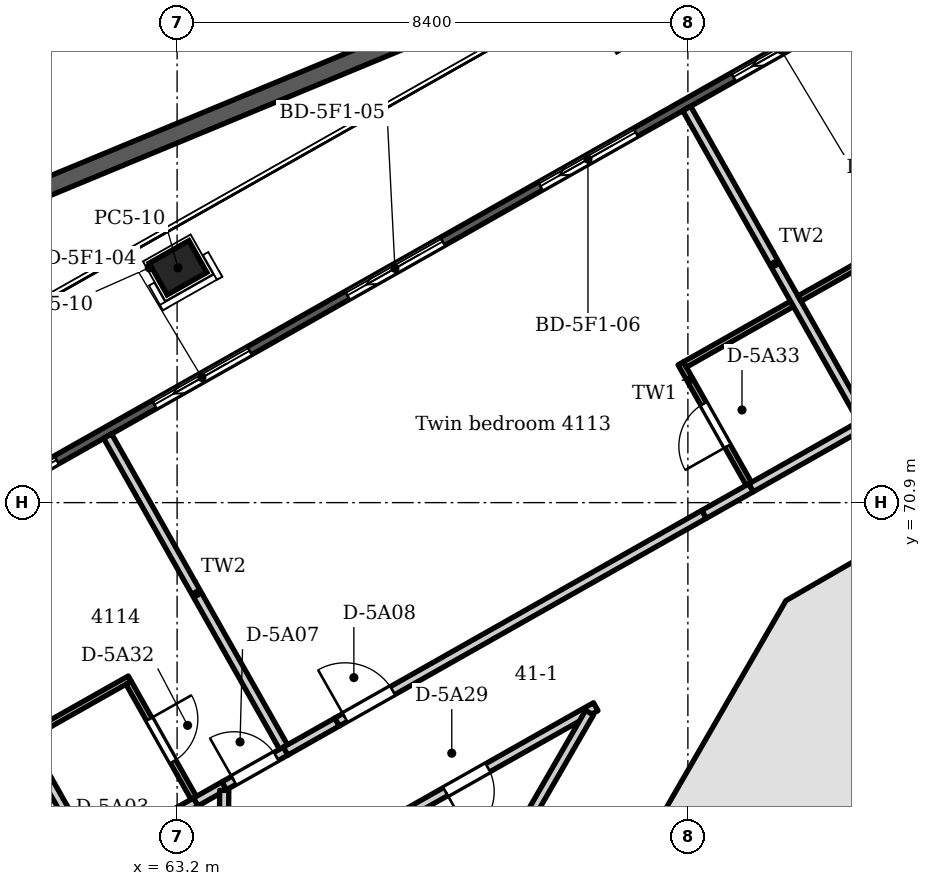
"""IFC4 building model, lengths in metres.
Left out: names, types, materials, properties, quantities, classifications, styles, units other than length and angle.
Written with IfcOpenShell. Run it as: python <this file> out.ifc"""

import sys

from ifc_helpers import new_model, si_unit, direction, frame, frame_2d, origin, origin_2d, place, context, subcontext, project, spatial, polyline, rectangle, outline, extrude, element, fill, save


model = new_model("IFC4")
c1 = context("Model", 3, precision=1e-05, world=origin(), true_north=direction((0.0, 1.0)))
c2 = subcontext(c1, "Body", "Model", "MODEL_VIEW")
j1 = project(units=[si_unit("LENGTHUNIT", "METRE"), si_unit("PLANEANGLEUNIT", "RADIAN")], contexts=[c1])
p1 = place(None, origin())
s1 = spatial("IfcSite", under=j1, at=p1, CompositionType="ELEMENT")
p2 = place(p1, origin())
s2 = spatial("IfcBuilding", under=s1, at=p2, CompositionType="ELEMENT")
p3 = place(p2, frame((0.0, 0.0, 161.1)))
s3 = spatial("IfcBuildingStorey", under=s2, at=p3, CompositionType="ELEMENT", Elevation=161.1)
p4 = place(p3, frame((77.74, 71.383, 0.0), z_axis=(0.0, 0.0, 1.0), x_axis=(-0.866003133579, -0.500038571144, 0.0)))
e1 = element("IfcWall", 1, at=p4, inside=s3, PredefinedType="SHEAR", context=c2, shape_type="SweptSolid", body=[
    extrude(outline(polyline([(0.0, -0.45), (4.969, -0.45), (4.728, 0.45), (0.241, 0.45), (0.0, -0.45)])), origin(), (0.0, 0.0, 1.0), 3.6),
])
p5 = place(p4, frame((0.895, 0.0, 0.0)))
e2 = element("IfcOpeningElement", 2, at=p5, cuts=e1, PredefinedType="OPENING", context=c2, shape_type="SweptSolid", body=[
    extrude(rectangle(XDim=0.9, YDim=2.1, at=frame_2d((0.45, 1.05))), frame((0.0, 0.46, 0.0), z_axis=(0.0, -1.0, 0.0), x_axis=(1.0, 0.0, 0.0)), (0.0, 0.0, 1.0), 0.92),
])
p6 = place(p4, frame((3.184, 0.0, 0.0)))
e3 = element("IfcOpeningElement", 3, at=p6, cuts=e1, PredefinedType="OPENING", context=c2, shape_type="SweptSolid", body=[
    extrude(rectangle(XDim=0.9, YDim=2.1, at=frame_2d((0.45, 1.05))), frame((0.0, 0.46, 0.0), z_axis=(0.0, -1.0, 0.0), x_axis=(1.0, 0.0, 0.0)), (0.0, 0.0, 1.0), 0.92),
])
p7 = place(p3, frame((73.602, 69.063, 0.0), z_axis=(0.0, 0.0, 1.0), x_axis=(-0.500038571144, -0.866003133579, 0.0)))
e4 = element("IfcWall", 4, at=p7, inside=s3, PredefinedType="SHEAR", context=c2, shape_type="SweptSolid", body=[
    extrude(outline(polyline([(0.0, -0.45), (4.969, -0.45), (4.728, 0.45), (0.241, 0.45), (0.0, -0.45)])), origin(), (0.0, 0.0, 1.0), 3.6),
])
p8 = place(p7, frame((1.285, 0.0, 0.0)))
e5 = element("IfcOpeningElement", 5, at=p8, cuts=e4, PredefinedType="OPENING", context=c2, shape_type="SweptSolid", body=[
    extrude(rectangle(XDim=2.4, YDim=2.1, at=frame_2d((1.2, 1.05))), frame((0.0, 0.46, 0.0), z_axis=(0.0, -1.0, 0.0), x_axis=(1.0, 0.0, 0.0)), (0.0, 0.0, 1.0), 0.92),
])
p9 = place(p3, frame((77.731, 65.369, 0.0), z_axis=(0.0, 0.0, 1.0), x_axis=(-0.865983655544, 0.500072303102, 0.0)))
e6 = element("IfcWall", 6, at=p9, inside=s3, PredefinedType="SHEAR", context=c2, shape_type="SweptSolid", body=[
    extrude(rectangle(XDim=4.973, YDim=0.3, at=frame_2d((2.487, 0.0))), origin(), (0.0, 0.0, 1.0), 3.6),
])
p10 = place(p9, frame((1.351, 0.0, 0.0)))
e7 = element("IfcOpeningElement", 7, at=p10, cuts=e6, PredefinedType="OPENING", context=c2, shape_type="SweptSolid", body=[
    extrude(rectangle(XDim=1.0, YDim=2.1, at=frame_2d((0.5, 1.05))), frame((0.0, 0.16, 0.0), z_axis=(0.0, -1.0, 0.0), x_axis=(1.0, 0.0, 0.0)), (0.0, 0.0, 1.0), 0.32),
])
p11 = place(p3, frame((63.215, 74.762, -0.35), z_axis=(0.0, 0.0, 1.0), x_axis=(0.87035569594, 0.492423560103, 0.0)))
e8 = element("IfcColumn", 8, at=p11, inside=s3, PredefinedType="COLUMN", context=c2, shape_type="SweptSolid", body=[
    extrude(rectangle(XDim=0.75, YDim=0.6, at=origin_2d()), origin(), (0.0, 0.0, 1.0), 3.95),
])
p12 = place(p3, frame((52.498, 66.67, 0.0), z_axis=(0.0, 0.0, 1.0), x_axis=(0.870354973249, 0.492424837453, 0.0)))
e9 = element("IfcWall", 9, at=p12, inside=s3, PredefinedType="SOLIDWALL", context=c2, shape_type="SweptSolid", body=[
    extrude(outline(polyline([(0.149, 0.075), (0.149, -0.075), (43.617, -0.075), (43.617, 0.075), (0.149, 0.075)])), origin(), (0.0, 0.0, 1.0), 3.3),
])
p13 = place(p12, frame((1.224, 0.0, 0.0)))
e10 = element("IfcOpeningElement", 10, at=p13, cuts=e9, PredefinedType="OPENING", context=c2, shape_type="SweptSolid", body=[
    extrude(rectangle(XDim=1.8, YDim=2.6, at=frame_2d((0.9, 1.3))), frame((0.0, 0.085, 0.0), z_axis=(0.0, -1.0, 0.0), x_axis=(1.0, 0.0, 0.0)), (0.0, 0.0, 1.0), 0.17),
])
p14 = place(p12, frame((4.571, 0.0, 0.0)))
e11 = element("IfcOpeningElement", 11, at=p14, cuts=e9, PredefinedType="OPENING", context=c2, shape_type="SweptSolid", body=[
    extrude(rectangle(XDim=1.8, YDim=2.6, at=frame_2d((0.9, 1.3))), frame((0.0, 0.085, 0.0), z_axis=(0.0, -1.0, 0.0), x_axis=(1.0, 0.0, 0.0)), (0.0, 0.0, 1.0), 0.17),
])
p15 = place(p12, frame((8.218, 0.0, 0.0)))
e12 = element("IfcOpeningElement", 12, at=p15, cuts=e9, PredefinedType="OPENING", context=c2, shape_type="SweptSolid", body=[
    extrude(rectangle(XDim=1.8, YDim=2.6, at=frame_2d((0.9, 1.3))), frame((0.0, 0.085, 0.0), z_axis=(0.0, -1.0, 0.0), x_axis=(1.0, 0.0, 0.0)), (0.0, 0.0, 1.0), 0.17),
])
p16 = place(p12, frame((11.865, 0.0, 0.0)))
e13 = element("IfcOpeningElement", 13, at=p16, cuts=e9, PredefinedType="OPENING", context=c2, shape_type="SweptSolid", body=[
    extrude(rectangle(XDim=1.8, YDim=2.6, at=frame_2d((0.9, 1.3))), frame((0.0, 0.085, 0.0), z_axis=(0.0, -1.0, 0.0), x_axis=(1.0, 0.0, 0.0)), (0.0, 0.0, 1.0), 0.17),
])
p17 = place(p12, frame((15.512, 0.0, 0.0)))
e14 = element("IfcOpeningElement", 14, at=p17, cuts=e9, PredefinedType="OPENING", context=c2, shape_type="SweptSolid", body=[
    extrude(rectangle(XDim=1.8, YDim=2.6, at=frame_2d((0.9, 1.3))), frame((0.0, 0.085, 0.0), z_axis=(0.0, -1.0, 0.0), x_axis=(1.0, 0.0, 0.0)), (0.0, 0.0, 1.0), 0.17),
])
p18 = place(p12, frame((19.16, 0.0, 0.0)))
e15 = element("IfcOpeningElement", 15, at=p18, cuts=e9, PredefinedType="OPENING", context=c2, shape_type="SweptSolid", body=[
    extrude(rectangle(XDim=1.8, YDim=2.6, at=frame_2d((0.9, 1.3))), frame((0.0, 0.085, 0.0), z_axis=(0.0, -1.0, 0.0), x_axis=(1.0, 0.0, 0.0)), (0.0, 0.0, 1.0), 0.17),
])
p19 = place(p12, frame((22.807, 0.0, 0.0)))
e16 = element("IfcOpeningElement", 16, at=p19, cuts=e9, PredefinedType="OPENING", context=c2, shape_type="SweptSolid", body=[
    extrude(rectangle(XDim=1.8, YDim=2.6, at=frame_2d((0.9, 1.3))), frame((0.0, 0.085, 0.0), z_axis=(0.0, -1.0, 0.0), x_axis=(1.0, 0.0, 0.0)), (0.0, 0.0, 1.0), 0.17),
])
p20 = place(p12, frame((26.454, 0.0, 0.0)))
e17 = element("IfcOpeningElement", 17, at=p20, cuts=e9, PredefinedType="OPENING", context=c2, shape_type="SweptSolid", body=[
    extrude(rectangle(XDim=1.8, YDim=2.6, at=frame_2d((0.9, 1.3))), frame((0.0, 0.085, 0.0), z_axis=(0.0, -1.0, 0.0), x_axis=(1.0, 0.0, 0.0)), (0.0, 0.0, 1.0), 0.17),
])
p21 = place(p12, frame((30.101, 0.0, 0.0)))
e18 = element("IfcOpeningElement", 18, at=p21, cuts=e9, PredefinedType="OPENING", context=c2, shape_type="SweptSolid", body=[
    extrude(rectangle(XDim=1.8, YDim=2.6, at=frame_2d((0.9, 1.3))), frame((0.0, 0.085, 0.0), z_axis=(0.0, -1.0, 0.0), x_axis=(1.0, 0.0, 0.0)), (0.0, 0.0, 1.0), 0.17),
])
p22 = place(p12, frame((33.748, 0.0, 0.0)))
e19 = element("IfcOpeningElement", 19, at=p22, cuts=e9, PredefinedType="OPENING", context=c2, shape_type="SweptSolid", body=[
    extrude(rectangle(XDim=1.8, YDim=2.6, at=frame_2d((0.9, 1.3))), frame((0.0, 0.085, 0.0), z_axis=(0.0, -1.0, 0.0), x_axis=(1.0, 0.0, 0.0)), (0.0, 0.0, 1.0), 0.17),
])
p23 = place(p12, frame((37.396, 0.0, 0.0)))
e20 = element("IfcOpeningElement", 20, at=p23, cuts=e9, PredefinedType="OPENING", context=c2, shape_type="SweptSolid", body=[
    extrude(rectangle(XDim=1.8, YDim=2.6, at=frame_2d((0.9, 1.3))), frame((0.0, 0.085, 0.0), z_axis=(0.0, -1.0, 0.0), x_axis=(1.0, 0.0, 0.0)), (0.0, 0.0, 1.0), 0.17),
])
p24 = place(p12, frame((40.743, 0.0, 0.0)))
e21 = element("IfcOpeningElement", 21, at=p24, cuts=e9, PredefinedType="OPENING", context=c2, shape_type="SweptSolid", body=[
    extrude(rectangle(XDim=1.8, YDim=2.6, at=frame_2d((0.9, 1.3))), frame((0.0, 0.085, 0.0), z_axis=(0.0, -1.0, 0.0), x_axis=(1.0, 0.0, 0.0)), (0.0, 0.0, 1.0), 0.17),
])
p25 = place(p3, origin())
e22 = element("IfcWall", 22, at=p25, inside=s3, PredefinedType="PARAPET", context=c2, shape_type="SweptSolid", body=[
    extrude(outline(polyline([(74.388, 81.773), (46.836, 70.36), (47.111, 70.149), (72.246, 80.561), (74.388, 81.773)])), origin(), (0.0, 0.0, 1.0), 1.1),
])
p26 = place(p3, frame((58.884, 70.197, 0.0), z_axis=(0.0, 0.0, 1.0), x_axis=(0.492361245758, -0.870390948756, 0.0)))
e23 = element("IfcWall", 23, at=p26, inside=s3, PredefinedType="PARTITIONING", context=c2, shape_type="SweptSolid", body=[
    extrude(rectangle(XDim=5.875, YDim=0.15, at=frame_2d((2.937, 0.0))), origin(), (0.0, 0.0, 1.0), 3.3),
])
p27 = place(p3, frame((60.113, 64.057, 0.0), z_axis=(0.0, 0.0, 1.0), x_axis=(0.870300828713, 0.492520524995, 0.0)))
e24 = element("IfcWall", 24, at=p27, inside=s3, PredefinedType="PARTITIONING", context=c2, shape_type="SweptSolid", body=[
    extrude(rectangle(XDim=3.906, YDim=0.15, at=frame_2d((1.953, 0.0))), origin(), (0.0, 0.0, 1.0), 3.3),
])
p28 = place(p3, frame((60.745, 67.058, 0.0), z_axis=(0.0, 0.0, 1.0), x_axis=(0.870465997858, 0.492228551156, 0.0)))
e25 = element("IfcWall", 25, at=p28, inside=s3, PredefinedType="PARTITIONING", context=c2, shape_type="SweptSolid", body=[
    extrude(rectangle(XDim=1.926, YDim=0.1, at=frame_2d((0.963, 0.0))), origin(), (0.0, 0.0, 1.0), 3.3),
])
p29 = place(p3, frame((62.058, 71.993, 0.0), z_axis=(0.0, 0.0, 1.0), x_axis=(0.492391211334, -0.870373997199, 0.0)))
e26 = element("IfcWall", 26, at=p29, inside=s3, PredefinedType="PARTITIONING", context=c2, shape_type="SweptSolid", body=[
    extrude(rectangle(XDim=5.949, YDim=0.15, at=frame_2d((2.975, 0.0))), origin(), (0.0, 0.0, 1.0), 3.3),
])
p30 = place(p3, frame((62.403, 67.938, 0.0), z_axis=(0.0, 0.0, 1.0), x_axis=(0.492205197529, -0.870479203385, 0.0)))
e27 = element("IfcWall", 27, at=p30, inside=s3, PredefinedType="PARTITIONING", context=c2, shape_type="SweptSolid", body=[
    extrude(rectangle(XDim=2.175, YDim=0.1, at=frame_2d((1.087, 0.0))), origin(), (0.0, 0.0, 1.0), 3.3),
])
p31 = place(p30, frame((0.688, 0.0, 0.0)))
e28 = element("IfcOpeningElement", 28, at=p31, cuts=e27, PredefinedType="OPENING", context=c2, shape_type="SweptSolid", body=[
    extrude(rectangle(XDim=0.8, YDim=2.1, at=frame_2d((0.4, 1.05))), frame((0.0, 0.06, 0.0), z_axis=(0.0, -1.0, 0.0), x_axis=(1.0, 0.0, 0.0)), (0.0, 0.0, 1.0), 0.12),
])
p32 = place(p3, frame((63.507, 65.977, 0.0), z_axis=(0.0, 0.0, 1.0), x_axis=(0.869938000449, 0.493161104888, 0.0)))
e29 = element("IfcWall", 29, at=p32, inside=s3, PredefinedType="PARTITIONING", context=c2, shape_type="SweptSolid", body=[
    extrude(rectangle(XDim=0.539, YDim=0.15, at=frame_2d((0.27, 0.0))), origin(), (0.0, 0.0, 1.0), 3.3),
])
p33 = place(p3, frame((63.932, 61.183, 0.0), z_axis=(0.0, 0.0, 1.0), x_axis=(0.008717466764, 0.999962002165, 0.0)))
e30 = element("IfcWall", 30, at=p33, inside=s3, PredefinedType="PARTITIONING", context=c2, shape_type="SweptSolid", body=[
    extrude(rectangle(XDim=4.985, YDim=0.15, at=frame_2d((2.493, 0.0))), origin(), (0.0, 0.0, 1.0), 2.75),
])
p34 = place(p33, frame((2.459, 0.0, 0.0)))
e31 = element("IfcOpeningElement", 31, at=p34, cuts=e30, PredefinedType="OPENING", context=c2, shape_type="SweptSolid", body=[
    extrude(rectangle(XDim=1.8, YDim=2.1, at=frame_2d((0.9, 1.05))), frame((0.0, 0.085, 0.0), z_axis=(0.0, -1.0, 0.0), x_axis=(1.0, 0.0, 0.0)), (0.0, 0.0, 1.0), 0.17),
])
p35 = place(p3, frame((63.976, 66.243, 0.0), z_axis=(0.0, 0.0, 1.0), x_axis=(0.870234820761, 0.492637145102, 0.0)))
e32 = element("IfcWall", 32, at=p35, inside=s3, PredefinedType="PARTITIONING", context=c2, shape_type="SweptSolid", body=[
    extrude(rectangle(XDim=1.165, YDim=0.15, at=frame_2d((0.583, 0.0))), origin(), (0.0, 0.0, 1.0), 3.3),
])
p36 = place(p35, frame((0.181, 0.0, 0.0)))
e33 = element("IfcOpeningElement", 33, at=p36, cuts=e32, PredefinedType="OPENING", context=c2, shape_type="SweptSolid", body=[
    extrude(rectangle(XDim=0.8, YDim=2.1, at=frame_2d((0.4, 1.05))), frame((0.0, 0.085, 0.0), z_axis=(0.0, -1.0, 0.0), x_axis=(1.0, 0.0, 0.0)), (0.0, 0.0, 1.0), 0.17),
])
p37 = place(p3, frame((64.984, 66.813, 0.0), z_axis=(0.0, 0.0, 1.0), x_axis=(0.870488073498, 0.492189510145, 0.0)))
e34 = element("IfcWall", 34, at=p37, inside=s3, PredefinedType="PARTITIONING", context=c2, shape_type="SweptSolid", body=[
    extrude(rectangle(XDim=0.973, YDim=0.15, at=frame_2d((0.487, 0.0))), origin(), (0.0, 0.0, 1.0), 3.3),
])
p38 = place(p3, frame((65.831, 67.292, 0.0), z_axis=(0.0, 0.0, 1.0), x_axis=(0.870315513683, 0.492494575242, 0.0)))
e35 = element("IfcWall", 35, at=p38, inside=s3, PredefinedType="PARTITIONING", context=c2, shape_type="SweptSolid", body=[
    extrude(rectangle(XDim=6.934, YDim=0.15, at=frame_2d((3.467, 0.0))), origin(), (0.0, 0.0, 1.0), 3.3),
])
p39 = place(p38, frame((0.15, 0.0, 0.0)))
e36 = element("IfcOpeningElement", 36, at=p39, cuts=e35, PredefinedType="OPENING", context=c2, shape_type="SweptSolid", body=[
    extrude(rectangle(XDim=0.9, YDim=2.1, at=frame_2d((0.45, 1.05))), frame((0.0, 0.085, 0.0), z_axis=(0.0, -1.0, 0.0), x_axis=(1.0, 0.0, 0.0)), (0.0, 0.0, 1.0), 0.17),
])
p40 = place(p3, frame((65.907, 65.181, 0.0), z_axis=(0.0, 0.0, 1.0), x_axis=(0.870373278687, 0.492392481408, 0.0)))
e37 = element("IfcWall", 37, at=p40, inside=s3, PredefinedType="PARTITIONING", context=c2, shape_type="SweptSolid", body=[
    extrude(rectangle(XDim=4.799, YDim=0.15, at=frame_2d((2.399, 0.0))), origin(), (0.0, 0.0, 1.0), 3.3),
])
p41 = place(p40, frame((1.962, 0.0, 0.0)))
e38 = element("IfcOpeningElement", 38, at=p41, cuts=e37, PredefinedType="OPENING", context=c2, shape_type="SweptSolid", body=[
    extrude(rectangle(XDim=0.8, YDim=2.1, at=frame_2d((0.4, 1.05))), frame((0.0, 0.085, 0.0), z_axis=(0.0, -1.0, 0.0), x_axis=(1.0, 0.0, 0.0)), (0.0, 0.0, 1.0), 0.17),
])
p42 = place(p3, frame((68.889, 65.552, 0.0), z_axis=(0.0, 0.0, 1.0), x_axis=(0.499825543119, 0.866126103086, 0.0)))
e39 = element("IfcWall", 39, at=p42, inside=s3, PredefinedType="PARTITIONING", context=c2, shape_type="SweptSolid", body=[
    extrude(rectangle(XDim=2.187, YDim=0.15, at=frame_2d((1.093, 0.0))), origin(), (0.0, 0.0, 1.0), 3.3),
])
p43 = place(p3, frame((71.482, 73.189, 0.0), z_axis=(0.0, 0.0, 1.0), x_axis=(0.492181026221, -0.870492870406, 0.0)))
e40 = element("IfcWall", 40, at=p43, inside=s3, PredefinedType="PARTITIONING", context=c2, shape_type="SweptSolid", body=[
    extrude(rectangle(XDim=2.275, YDim=0.1, at=frame_2d((1.137, 0.0))), origin(), (0.0, 0.0, 1.0), 3.3),
])
p44 = place(p43, frame((0.762, 0.0, 0.0)))
e41 = element("IfcOpeningElement", 41, at=p44, cuts=e40, PredefinedType="OPENING", context=c2, shape_type="SweptSolid", body=[
    extrude(rectangle(XDim=0.8, YDim=2.1, at=frame_2d((0.4, 1.05))), frame((0.0, 0.06, 0.0), z_axis=(0.0, -1.0, 0.0), x_axis=(1.0, 0.0, 0.0)), (0.0, 0.0, 1.0), 0.12),
])
p45 = place(p3, frame((71.551, 73.171, 0.0), z_axis=(0.0, 0.0, 1.0), x_axis=(0.87023930122, 0.492629230367, 0.0)))
e42 = element("IfcWall", 42, at=p45, inside=s3, PredefinedType="PARTITIONING", context=c2, shape_type="SweptSolid", body=[
    extrude(rectangle(XDim=2.025, YDim=0.1, at=frame_2d((1.012, 0.0))), origin(), (0.0, 0.0, 1.0), 3.3),
])
p46 = place(p3, frame((71.581, 77.381, 0.0), z_axis=(0.0, 0.0, 1.0), x_axis=(0.4923790567, -0.870380873252, 0.0)))
e43 = element("IfcWall", 43, at=p46, inside=s3, PredefinedType="PARTITIONING", context=c2, shape_type="SweptSolid", body=[
    extrude(rectangle(XDim=5.874, YDim=0.15, at=frame_2d((2.937, 0.0))), origin(), (0.0, 0.0, 1.0), 3.3),
])
p47 = place(p3, frame((71.866, 70.707, 0.0), z_axis=(0.0, 0.0, 1.0), x_axis=(0.870501381105, 0.492165973524, 0.0)))
e44 = element("IfcWall", 44, at=p47, inside=s3, PredefinedType="PARTITIONING", context=c2, shape_type="SweptSolid", body=[
    extrude(rectangle(XDim=0.888, YDim=0.15, at=frame_2d((0.444, 0.0))), origin(), (0.0, 0.0, 1.0), 3.3),
])
p48 = place(p3, frame((72.639, 71.144, 0.0), z_axis=(0.0, 0.0, 1.0), x_axis=(0.870311041837, 0.492502477615, 0.0)))
e45 = element("IfcWall", 45, at=p48, inside=s3, PredefinedType="PARTITIONING", context=c2, shape_type="SweptSolid", body=[
    extrude(rectangle(XDim=2.15, YDim=0.15, at=frame_2d((1.075, 0.0))), origin(), (0.0, 0.0, 1.0), 3.3),
])
p49 = place(p3, frame((73.435, 74.256, 0.0), z_axis=(0.0, 0.0, 1.0), x_axis=(0.870265219316, 0.492583442726, 0.0)))
e46 = element("IfcWall", 46, at=p49, inside=s3, PredefinedType="PARTITIONING", context=c2, shape_type="SweptSolid", body=[
    extrude(rectangle(XDim=2.125, YDim=0.1, at=frame_2d((1.062, 0.0))), origin(), (0.0, 0.0, 1.0), 3.3),
])
p50 = place(p15, origin())
e47 = element("IfcDoor", 47, at=p50, inside=s3, OperationType="SLIDING_TO_LEFT", PredefinedType="DOOR", context=c2, shape_type="SweptSolid", body=[
    extrude(rectangle(XDim=1.8, YDim=2.6, at=frame_2d((0.9, 1.3))), frame((0.0, 0.025, 0.0), z_axis=(0.0, -1.0, 0.0), x_axis=(1.0, 0.0, 0.0)), (0.0, 0.0, 1.0), 0.05),
])
fill(e12, e47)
p51 = place(p16, origin())
e48 = element("IfcDoor", 48, at=p51, inside=s3, OperationType="SLIDING_TO_LEFT", PredefinedType="DOOR", context=c2, shape_type="SweptSolid", body=[
    extrude(rectangle(XDim=1.8, YDim=2.6, at=frame_2d((0.9, 1.3))), frame((0.0, 0.025, 0.0), z_axis=(0.0, -1.0, 0.0), x_axis=(1.0, 0.0, 0.0)), (0.0, 0.0, 1.0), 0.05),
])
fill(e13, e48)
p52 = place(p17, origin())
e49 = element("IfcDoor", 49, at=p52, inside=s3, OperationType="SLIDING_TO_LEFT", PredefinedType="DOOR", context=c2, shape_type="SweptSolid", body=[
    extrude(rectangle(XDim=1.8, YDim=2.6, at=frame_2d((0.9, 1.3))), frame((0.0, 0.025, 0.0), z_axis=(0.0, -1.0, 0.0), x_axis=(1.0, 0.0, 0.0)), (0.0, 0.0, 1.0), 0.05),
])
fill(e14, e49)
p53 = place(p18, origin())
e50 = element("IfcDoor", 50, at=p53, inside=s3, OperationType="SLIDING_TO_LEFT", PredefinedType="DOOR", context=c2, shape_type="SweptSolid", body=[
    extrude(rectangle(XDim=1.8, YDim=2.6, at=frame_2d((0.9, 1.3))), frame((0.0, 0.025, 0.0), z_axis=(0.0, -1.0, 0.0), x_axis=(1.0, 0.0, 0.0)), (0.0, 0.0, 1.0), 0.05),
])
fill(e15, e50)
p54 = place(p19, origin())
e51 = element("IfcDoor", 51, at=p54, inside=s3, OperationType="SLIDING_TO_LEFT", PredefinedType="DOOR", context=c2, shape_type="SweptSolid", body=[
    extrude(rectangle(XDim=1.8, YDim=2.6, at=frame_2d((0.9, 1.3))), frame((0.0, 0.025, 0.0), z_axis=(0.0, -1.0, 0.0), x_axis=(1.0, 0.0, 0.0)), (0.0, 0.0, 1.0), 0.05),
])
fill(e16, e51)
p55 = place(p36, origin())
e52 = element("IfcDoor", 52, at=p55, inside=s3, OperationType="SINGLE_SWING_LEFT", PredefinedType="DOOR", context=c2, shape_type="SweptSolid", body=[
    extrude(rectangle(XDim=0.8, YDim=2.1, at=frame_2d((0.4, 1.05))), frame((0.0, 0.025, 0.0), z_axis=(0.0, -1.0, 0.0), x_axis=(1.0, 0.0, 0.0)), (0.0, 0.0, 1.0), 0.05),
])
fill(e33, e52)
p56 = place(p39, origin())
e53 = element("IfcDoor", 53, at=p56, inside=s3, OperationType="SINGLE_SWING_LEFT", PredefinedType="DOOR", context=c2, shape_type="SweptSolid", body=[
    extrude(rectangle(XDim=0.9, YDim=2.1, at=frame_2d((0.45, 1.05))), frame((0.0, 0.025, 0.0), z_axis=(0.0, -1.0, 0.0), x_axis=(1.0, 0.0, 0.0)), (0.0, 0.0, 1.0), 0.05),
])
fill(e36, e53)
p57 = place(p41, frame((0.8, 0.0, 0.0), z_axis=(0.0, 0.0, 1.0), x_axis=(-1.0, 0.0, 0.0)))
e54 = element("IfcDoor", 54, at=p57, inside=s3, OperationType="SINGLE_SWING_RIGHT", PredefinedType="DOOR", context=c2, shape_type="SweptSolid", body=[
    extrude(rectangle(XDim=0.8, YDim=2.1, at=frame_2d((0.4, 1.05))), frame((0.0, 0.025, 0.0), z_axis=(0.0, -1.0, 0.0), x_axis=(1.0, 0.0, 0.0)), (0.0, 0.0, 1.0), 0.05),
])
fill(e38, e54)
p58 = place(p31, origin())
e55 = element("IfcDoor", 55, at=p58, inside=s3, OperationType="SINGLE_SWING_LEFT", PredefinedType="DOOR", context=c2, shape_type="SweptSolid", body=[
    extrude(rectangle(XDim=0.8, YDim=2.1, at=frame_2d((0.4, 1.05))), frame((0.0, 0.025, 0.0), z_axis=(0.0, -1.0, 0.0), x_axis=(1.0, 0.0, 0.0)), (0.0, 0.0, 1.0), 0.05),
])
fill(e28, e55)
p59 = place(p44, frame((0.8, 0.0, 0.0), z_axis=(0.0, 0.0, 1.0), x_axis=(-1.0, 0.0, 0.0)))
e56 = element("IfcDoor", 56, at=p59, inside=s3, OperationType="SINGLE_SWING_LEFT", PredefinedType="DOOR", context=c2, shape_type="SweptSolid", body=[
    extrude(rectangle(XDim=0.8, YDim=2.1, at=frame_2d((0.4, 1.05))), frame((0.0, 0.025, 0.0), z_axis=(0.0, -1.0, 0.0), x_axis=(1.0, 0.0, 0.0)), (0.0, 0.0, 1.0), 0.05),
])
fill(e41, e56)
p60 = place(p8, origin())
e57 = element("IfcDoor", 57, at=p60, inside=s3, OperationType="DOUBLE_DOOR_SINGLE_SWING", PredefinedType="DOOR", context=c2, shape_type="SweptSolid", body=[
    extrude(rectangle(XDim=2.4, YDim=2.1, at=frame_2d((1.2, 1.05))), frame((0.0, 0.025, 0.0), z_axis=(0.0, -1.0, 0.0), x_axis=(1.0, 0.0, 0.0)), (0.0, 0.0, 1.0), 0.05),
])
fill(e5, e57)
p61 = place(p6, origin())
e58 = element("IfcDoor", 58, at=p61, inside=s3, OperationType="SINGLE_SWING_RIGHT", PredefinedType="DOOR", context=c2, shape_type="SweptSolid", body=[
    extrude(rectangle(XDim=0.9, YDim=2.1, at=frame_2d((0.45, 1.05))), frame((0.0, 0.175, 0.0), z_axis=(0.0, -1.0, 0.0), x_axis=(1.0, 0.0, 0.0)), (0.0, 0.0, 1.0), 0.05),
])
fill(e3, e58)
save(model, sys.argv[1])
